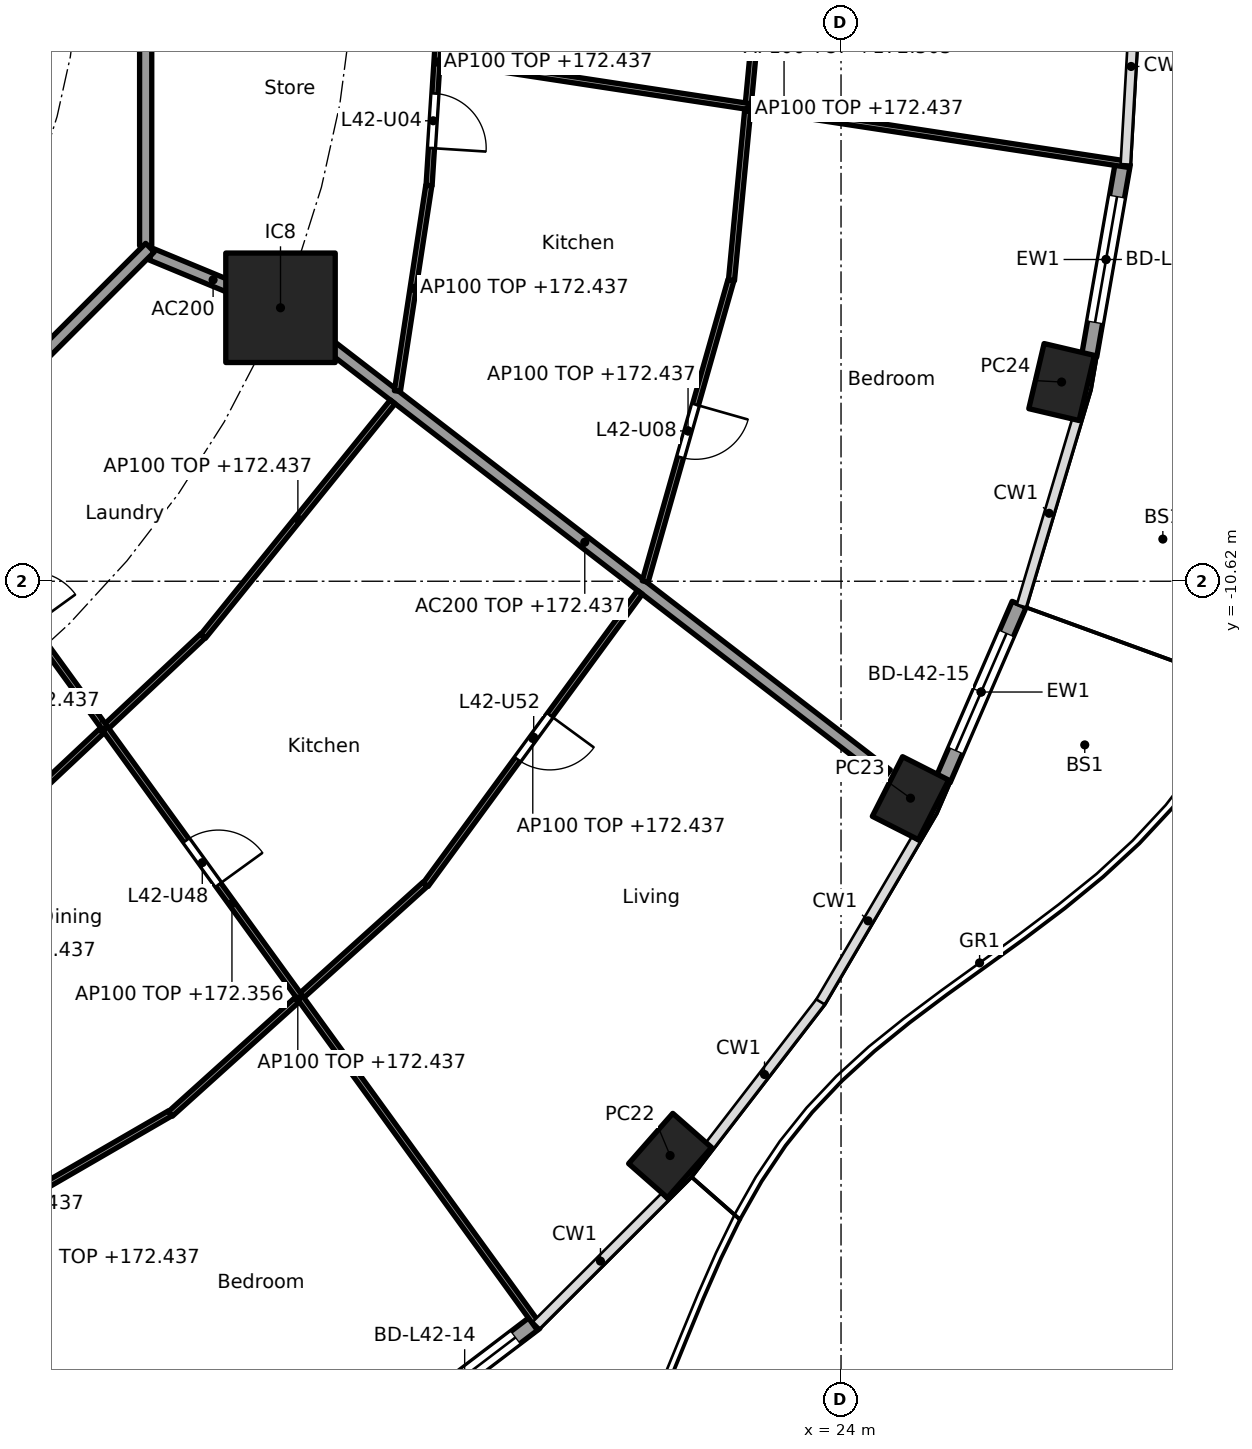
"""IFC4 building model, lengths in metres.
Left out: names, types, materials, properties, quantities, classifications, styles, units other than length and angle.
Written with IfcOpenShell. Run it as: python <this file> out.ifc"""

import sys

from ifc_helpers import new_model, si_unit, direction, frame, frame_2d, origin, origin_2d, place, context, subcontext, project, spatial, rectangle, hollow_rectangle, extrude, element, fill, save


model = new_model("IFC4")
c1 = context("Model", 3, precision=1e-05, world=origin(), true_north=direction((0.0, 1.0)))
c2 = subcontext(c1, "Body", "Model", "MODEL_VIEW")
j1 = project(units=[si_unit("LENGTHUNIT", "METRE"), si_unit("PLANEANGLEUNIT", "RADIAN")], contexts=[c1])
p1 = place(None, origin())
s1 = spatial("IfcSite", under=j1, at=p1, CompositionType="ELEMENT")
p2 = place(p1, origin())
s2 = spatial("IfcBuilding", under=s1, at=p2, CompositionType="ELEMENT")
p3 = place(p2, frame((0.0, 0.0, 169.6)))
s3 = spatial("IfcBuildingStorey", under=s2, at=p3, CompositionType="ELEMENT", Elevation=169.6)
for number, where, z_axis, x_axis in (
    (1, (21.189, -20.064, 0.0), (0.0, 0.0, 1.0), (0.66, 0.751, 0.0)),
    (2, (25.142, -14.188, 0.0), (0.0, 0.0, 1.0), (0.452, 0.892, 0.0)),
    (3, (27.627, -7.344, 0.0), (0.0, 0.0, 1.0), (0.229, 0.973, 0.0)),
):
    element("IfcColumn", number, at=place(p3, frame(where, z_axis=z_axis, x_axis=x_axis)), inside=s3, PredefinedType="COLUMN", context=c2, shape_type="SweptSolid", body=[
        extrude(hollow_rectangle(XDim=1.1, YDim=0.85, WallThickness=0.036, at=origin_2d()), origin(), (0.0, 0.0, 1.0), 3.7),
    ])
p4 = place(p3, frame((14.782, -6.123, 0.0), z_axis=(0.0, 0.0, 1.0), x_axis=(1.0, 0.0, 0.0)))
e4 = element("IfcColumn", 4, at=p4, inside=s3, PredefinedType="COLUMN", context=c2, shape_type="SweptSolid", body=[
    extrude(rectangle(XDim=1.8, YDim=1.8, at=origin_2d()), origin(), (0.0, 0.0, 1.0), 3.7),
])
p5 = place(p3, frame((18.972, -22.809, 0.0), z_axis=(0.0, 0.0, 1.0), x_axis=(-0.796055733703, -0.60522332146, 0.0)))
e5 = element("IfcWall", 5, at=p5, inside=s3, PredefinedType="SOLIDWALL", context=c2, shape_type="SweptSolid", body=[
    extrude(rectangle(XDim=2.917, YDim=0.25, at=frame_2d((1.458, 0.0))), origin(), (0.0, 0.0, 1.0), 3.44),
])
p6 = place(p5, frame((0.408, 0.0, 0.0)))
e6 = element("IfcOpeningElement", 6, at=p6, cuts=e5, PredefinedType="OPENING", context=c2, shape_type="SweptSolid", body=[
    extrude(rectangle(XDim=2.1, YDim=2.4, at=frame_2d((1.05, 1.2))), frame((0.0, 0.135, 0.0), z_axis=(0.0, -1.0, 0.0), x_axis=(1.0, 0.0, 0.0)), (0.0, 0.0, 1.0), 0.27),
])
p7 = place(p3, frame((26.929, -11.0, 0.0), z_axis=(0.0, 0.0, 1.0), x_axis=(-0.397620521824, -0.917549955384, 0.0)))
e7 = element("IfcWall", 7, at=p7, inside=s3, PredefinedType="SOLIDWALL", context=c2, shape_type="SweptSolid", body=[
    extrude(rectangle(XDim=3.142, YDim=0.25, at=frame_2d((1.571, 0.0))), origin(), (0.0, 0.0, 1.0), 3.44),
])
p8 = place(p7, frame((0.521, 0.0, 0.0)))
e8 = element("IfcOpeningElement", 8, at=p8, cuts=e7, PredefinedType="OPENING", context=c2, shape_type="SweptSolid", body=[
    extrude(rectangle(XDim=2.1, YDim=2.4, at=frame_2d((1.05, 1.2))), frame((0.0, 0.135, 0.0), z_axis=(0.0, -1.0, 0.0), x_axis=(1.0, 0.0, 0.0)), (0.0, 0.0, 1.0), 0.27),
])
p9 = place(p3, frame((28.635, -3.747, 0.0), z_axis=(0.0, 0.0, 1.0), x_axis=(-0.172149769468, -0.985070787747, 0.0)))
e9 = element("IfcWall", 9, at=p9, inside=s3, PredefinedType="SOLIDWALL", context=c2, shape_type="SweptSolid", body=[
    extrude(rectangle(XDim=3.211, YDim=0.25, at=frame_2d((1.605, 0.0))), origin(), (0.0, 0.0, 1.0), 3.44),
])
p10 = place(p9, frame((0.555, 0.0, 0.0)))
e10 = element("IfcOpeningElement", 10, at=p10, cuts=e9, PredefinedType="OPENING", context=c2, shape_type="SweptSolid", body=[
    extrude(rectangle(XDim=2.1, YDim=2.4, at=frame_2d((1.05, 1.2))), frame((0.0, 0.135, 0.0), z_axis=(0.0, -1.0, 0.0), x_axis=(1.0, 0.0, 0.0)), (0.0, 0.0, 1.0), 0.27),
])
p11 = place(p3, frame((12.657, -5.243, 0.0), z_axis=(0.0, 0.0, 1.0), x_axis=(0.92383017907, -0.382802560388, 0.0)))
e11 = element("IfcWall", 11, at=p11, inside=s3, PredefinedType="PARTITIONING", context=c2, shape_type="SweptSolid", body=[
    extrude(rectangle(XDim=2.2, YDim=0.2, at=frame_2d((1.1, 0.0))), origin(), (0.0, 0.0, 1.0), 3.44),
])
p12 = place(p3, frame((14.822, -6.154, 0.0), z_axis=(0.0, 0.0, 1.0), x_axis=(0.792203056092, -0.610257583254, 0.0)))
e12 = element("IfcWall", 12, at=p12, inside=s3, PredefinedType="PARTITIONING", context=c2, shape_type="SweptSolid", body=[
    extrude(rectangle(XDim=12.533, YDim=0.2, at=frame_2d((6.266, 0.0))), origin(), (0.0, 0.0, 1.0), 2.837),
])
p13 = place(p3, frame((12.565, -5.104, 0.0), z_axis=(0.0, 0.0, 1.0), x_axis=(0.0, 1.0, 0.0)))
e13 = element("IfcWall", 13, at=p13, inside=s3, PredefinedType="PARTITIONING", context=c2, shape_type="SweptSolid", body=[
    extrude(rectangle(XDim=10.209, YDim=0.2, at=frame_2d((5.104, 0.0))), origin(), (0.0, 0.0, 1.0), 3.44),
])
p14 = place(p13, frame((5.906, 0.0, 0.0)))
e14 = element("IfcOpeningElement", 14, at=p14, cuts=e13, PredefinedType="OPENING", context=c2, shape_type="SweptSolid", body=[
    extrude(rectangle(XDim=1.0, YDim=2.1, at=frame_2d((0.5, 1.05))), frame((0.0, 0.11, 0.0), z_axis=(0.0, -1.0, 0.0), x_axis=(1.0, 0.0, 0.0)), (0.0, 0.0, 1.0), 0.22),
])
p15 = place(p3, frame((5.275, -12.494, 0.0), z_axis=(0.0, 0.0, 1.0), x_axis=(0.707106781187, 0.707106781187, 0.0)))
e15 = element("IfcWall", 15, at=p15, inside=s3, PredefinedType="PARTITIONING", context=c2, shape_type="SweptSolid", body=[
    extrude(rectangle(XDim=10.409, YDim=0.2, at=frame_2d((5.205, 0.0))), origin(), (0.0, 0.0, 1.0), 3.44),
])
p16 = place(p3, frame((17.485, -0.05, 0.0), z_axis=(0.0, 0.0, 1.0), x_axis=(-0.063673473968, -0.997970785501, 0.0)))
e16 = element("IfcWall", 16, at=p16, inside=s3, PredefinedType="PARTITIONING", context=c2, shape_type="SweptSolid", body=[
    extrude(rectangle(XDim=4.072, YDim=0.1, at=frame_2d((2.036, 0.0))), origin(), (0.0, 0.0, 1.0), 2.837),
])
p17 = place(p16, frame((2.554, 0.0, 0.0)))
e17 = element("IfcOpeningElement", 17, at=p17, cuts=e16, PredefinedType="OPENING", context=c2, shape_type="SweptSolid", body=[
    extrude(rectangle(XDim=0.9, YDim=2.1, at=frame_2d((0.45, 1.05))), frame((0.0, 0.06, 0.0), z_axis=(0.0, -1.0, 0.0), x_axis=(1.0, 0.0, 0.0)), (0.0, 0.0, 1.0), 0.12),
])
p18 = place(p3, frame((22.734, -0.05, 0.0), z_axis=(0.0, 0.0, 1.0), x_axis=(-0.0949274088, -0.995484197292, 0.0)))
e18 = element("IfcWall", 18, at=p18, inside=s3, PredefinedType="PARTITIONING", context=c2, shape_type="SweptSolid", body=[
    extrude(rectangle(XDim=5.648, YDim=0.1, at=frame_2d((2.824, 0.0))), origin(), (0.0, 0.0, 1.0), 2.837),
])
p19 = place(p3, frame((8.405, -22.013, 0.0), z_axis=(0.0, 0.0, 1.0), x_axis=(0.865277177388, 0.501293732547, 0.0)))
e19 = element("IfcWall", 19, at=p19, inside=s3, PredefinedType="PARTITIONING", context=c2, shape_type="SweptSolid", body=[
    extrude(rectangle(XDim=5.27, YDim=0.1, at=frame_2d((2.635, 0.0))), origin(), (0.0, 0.0, 1.0), 2.837),
])
p20 = place(p3, frame((10.21, -14.614, 0.0), z_axis=(0.0, 0.0, 1.0), x_axis=(0.728883199496, 0.684638066055, 0.0)))
e20 = element("IfcWall", 20, at=p20, inside=s3, PredefinedType="PARTITIONING", context=c2, shape_type="SweptSolid", body=[
    extrude(rectangle(XDim=4.519, YDim=0.1, at=frame_2d((2.26, 0.0))), origin(), (0.0, 0.0, 1.0), 2.837),
])
p21 = place(p3, frame((12.971, -19.38, 0.0), z_axis=(0.0, 0.0, 1.0), x_axis=(0.742768881471, 0.669547898748, 0.0)))
e21 = element("IfcWall", 21, at=p21, inside=s3, PredefinedType="PARTITIONING", context=c2, shape_type="SweptSolid", body=[
    extrude(rectangle(XDim=5.642, YDim=0.1, at=frame_2d((2.821, 0.0))), origin(), (0.0, 0.0, 1.0), 2.837),
])
p22 = place(p3, frame((8.943, -8.966, 0.0), z_axis=(0.0, 0.0, 1.0), x_axis=(0.586803608919, -0.809729290912, 0.0)))
e22 = element("IfcWall", 22, at=p22, inside=s3, PredefinedType="PARTITIONING", context=c2, shape_type="SweptSolid", body=[
    extrude(rectangle(XDim=17.179, YDim=0.1, at=frame_2d((8.589, 0.0))), origin(), (0.0, 0.0, 1.0), 2.756),
])
p23 = place(p22, frame((2.062, 0.0, 0.0)))
e23 = element("IfcOpeningElement", 23, at=p23, cuts=e22, PredefinedType="OPENING", context=c2, shape_type="SweptSolid", body=[
    extrude(rectangle(XDim=0.9, YDim=2.1, at=frame_2d((0.45, 1.05))), frame((0.0, 0.06, 0.0), z_axis=(0.0, -1.0, 0.0), x_axis=(1.0, 0.0, 0.0)), (0.0, 0.0, 1.0), 0.12),
])
p24 = place(p22, frame((7.308, 0.0, 0.0)))
e24 = element("IfcOpeningElement", 24, at=p24, cuts=e22, PredefinedType="OPENING", context=c2, shape_type="SweptSolid", body=[
    extrude(rectangle(XDim=0.9, YDim=2.1, at=frame_2d((0.45, 1.05))), frame((0.0, 0.06, 0.0), z_axis=(0.0, -1.0, 0.0), x_axis=(1.0, 0.0, 0.0)), (0.0, 0.0, 1.0), 0.12),
])
p25 = place(p3, frame((13.509, -11.525, 0.0), z_axis=(0.0, 0.0, 1.0), x_axis=(0.628764602857, 0.777595700987, 0.0)))
e25 = element("IfcWall", 25, at=p25, inside=s3, PredefinedType="PARTITIONING", context=c2, shape_type="SweptSolid", body=[
    extrude(rectangle(XDim=4.957, YDim=0.1, at=frame_2d((2.479, 0.0))), origin(), (0.0, 0.0, 1.0), 2.837),
])
p26 = place(p3, frame((17.169, -15.609, 0.0), z_axis=(0.0, 0.0, 1.0), x_axis=(0.591122127251, 0.806582066918, 0.0)))
e26 = element("IfcWall", 26, at=p26, inside=s3, PredefinedType="PARTITIONING", context=c2, shape_type="SweptSolid", body=[
    extrude(rectangle(XDim=5.96, YDim=0.1, at=frame_2d((2.98, 0.0))), origin(), (0.0, 0.0, 1.0), 2.837),
])
p27 = place(p26, frame((2.555, 0.0, 0.0)))
e27 = element("IfcOpeningElement", 27, at=p27, cuts=e26, PredefinedType="OPENING", context=c2, shape_type="SweptSolid", body=[
    extrude(rectangle(XDim=0.9, YDim=2.1, at=frame_2d((0.45, 1.05))), frame((0.0, 0.06, 0.0), z_axis=(0.0, -1.0, 0.0), x_axis=(1.0, 0.0, 0.0)), (0.0, 0.0, 1.0), 0.12),
])
p28 = place(p3, frame((16.704, -7.493, 0.0), z_axis=(0.0, 0.0, 1.0), x_axis=(0.1510806336, 0.988521442434, 0.0)))
e28 = element("IfcWall", 28, at=p28, inside=s3, PredefinedType="PARTITIONING", context=c2, shape_type="SweptSolid", body=[
    extrude(rectangle(XDim=3.419, YDim=0.1, at=frame_2d((1.71, 0.0))), origin(), (0.0, 0.0, 1.0), 2.837),
])
p29 = place(p3, frame((20.779, -10.625, 0.0), z_axis=(0.0, 0.0, 1.0), x_axis=(0.273819702124, 0.961781040949, 0.0)))
e29 = element("IfcWall", 29, at=p29, inside=s3, PredefinedType="PARTITIONING", context=c2, shape_type="SweptSolid", body=[
    extrude(rectangle(XDim=5.152, YDim=0.1, at=frame_2d((2.576, 0.0))), origin(), (0.0, 0.0, 1.0), 2.837),
])
p30 = place(p29, frame((2.126, 0.0, 0.0)))
e30 = element("IfcOpeningElement", 30, at=p30, cuts=e29, PredefinedType="OPENING", context=c2, shape_type="SweptSolid", body=[
    extrude(rectangle(XDim=0.9, YDim=2.1, at=frame_2d((0.45, 1.05))), frame((0.0, 0.06, 0.0), z_axis=(0.0, -1.0, 0.0), x_axis=(1.0, 0.0, 0.0)), (0.0, 0.0, 1.0), 0.12),
])
p31 = place(p3, frame((17.407, -2.039, 0.0), z_axis=(0.0, 0.0, 1.0), x_axis=(0.98858728603, -0.150649188184, 0.0)))
e31 = element("IfcWall", 31, at=p31, inside=s3, PredefinedType="PARTITIONING", context=c2, shape_type="SweptSolid", body=[
    extrude(rectangle(XDim=11.441, YDim=0.1, at=frame_2d((5.721, 0.0))), origin(), (0.0, 0.0, 1.0), 2.905),
])
p32 = place(p6, origin())
e32 = element("IfcDoor", 32, at=p32, inside=s3, OperationType="SLIDING_TO_LEFT", PredefinedType="DOOR", context=c2, shape_type="SweptSolid", body=[
    extrude(rectangle(XDim=2.1, YDim=2.4, at=frame_2d((1.05, 1.2))), frame((0.0, 0.025, 0.0), z_axis=(0.0, -1.0, 0.0), x_axis=(1.0, 0.0, 0.0)), (0.0, 0.0, 1.0), 0.05),
])
fill(e6, e32)
p33 = place(p8, origin())
e33 = element("IfcDoor", 33, at=p33, inside=s3, OperationType="SLIDING_TO_LEFT", PredefinedType="DOOR", context=c2, shape_type="SweptSolid", body=[
    extrude(rectangle(XDim=2.1, YDim=2.4, at=frame_2d((1.05, 1.2))), frame((0.0, 0.025, 0.0), z_axis=(0.0, -1.0, 0.0), x_axis=(1.0, 0.0, 0.0)), (0.0, 0.0, 1.0), 0.05),
])
fill(e8, e33)
p34 = place(p10, origin())
e34 = element("IfcDoor", 34, at=p34, inside=s3, OperationType="SLIDING_TO_LEFT", PredefinedType="DOOR", context=c2, shape_type="SweptSolid", body=[
    extrude(rectangle(XDim=2.1, YDim=2.4, at=frame_2d((1.05, 1.2))), frame((0.0, 0.025, 0.0), z_axis=(0.0, -1.0, 0.0), x_axis=(1.0, 0.0, 0.0)), (0.0, 0.0, 1.0), 0.05),
])
fill(e10, e34)
p35 = place(p17, origin())
e35 = element("IfcDoor", 35, at=p35, inside=s3, OperationType="SINGLE_SWING_RIGHT", PredefinedType="DOOR", context=c2, shape_type="SweptSolid", body=[
    extrude(rectangle(XDim=0.9, YDim=2.1, at=frame_2d((0.45, 1.05))), frame((0.0, 0.025, 0.0), z_axis=(0.0, -1.0, 0.0), x_axis=(1.0, 0.0, 0.0)), (0.0, 0.0, 1.0), 0.05),
])
fill(e17, e35)
p36 = place(p30, frame((0.9, 0.0, 0.0), x_axis=(-1.0, 0.0, 0.0)))
e36 = element("IfcDoor", 36, at=p36, inside=s3, OperationType="SINGLE_SWING_LEFT", PredefinedType="DOOR", context=c2, shape_type="SweptSolid", body=[
    extrude(rectangle(XDim=0.9, YDim=2.1, at=frame_2d((0.45, 1.05))), frame((0.0, 0.025, 0.0), z_axis=(0.0, -1.0, 0.0), x_axis=(1.0, 0.0, 0.0)), (0.0, 0.0, 1.0), 0.05),
])
fill(e30, e36)
p37 = place(p24, origin())
e37 = element("IfcDoor", 37, at=p37, inside=s3, OperationType="SINGLE_SWING_RIGHT", PredefinedType="DOOR", context=c2, shape_type="SweptSolid", body=[
    extrude(rectangle(XDim=0.9, YDim=2.1, at=frame_2d((0.45, 1.05))), frame((0.0, 0.025, 0.0), z_axis=(0.0, -1.0, 0.0), x_axis=(1.0, 0.0, 0.0)), (0.0, 0.0, 1.0), 0.05),
])
fill(e24, e37)
p38 = place(p27, frame((0.9, 0.0, 0.0), x_axis=(-1.0, 0.0, 0.0)))
e38 = element("IfcDoor", 38, at=p38, inside=s3, OperationType="SINGLE_SWING_LEFT", PredefinedType="DOOR", context=c2, shape_type="SweptSolid", body=[
    extrude(rectangle(XDim=0.9, YDim=2.1, at=frame_2d((0.45, 1.05))), frame((0.0, 0.025, 0.0), z_axis=(0.0, -1.0, 0.0), x_axis=(1.0, 0.0, 0.0)), (0.0, 0.0, 1.0), 0.05),
])
fill(e27, e38)
save(model, sys.argv[1])
